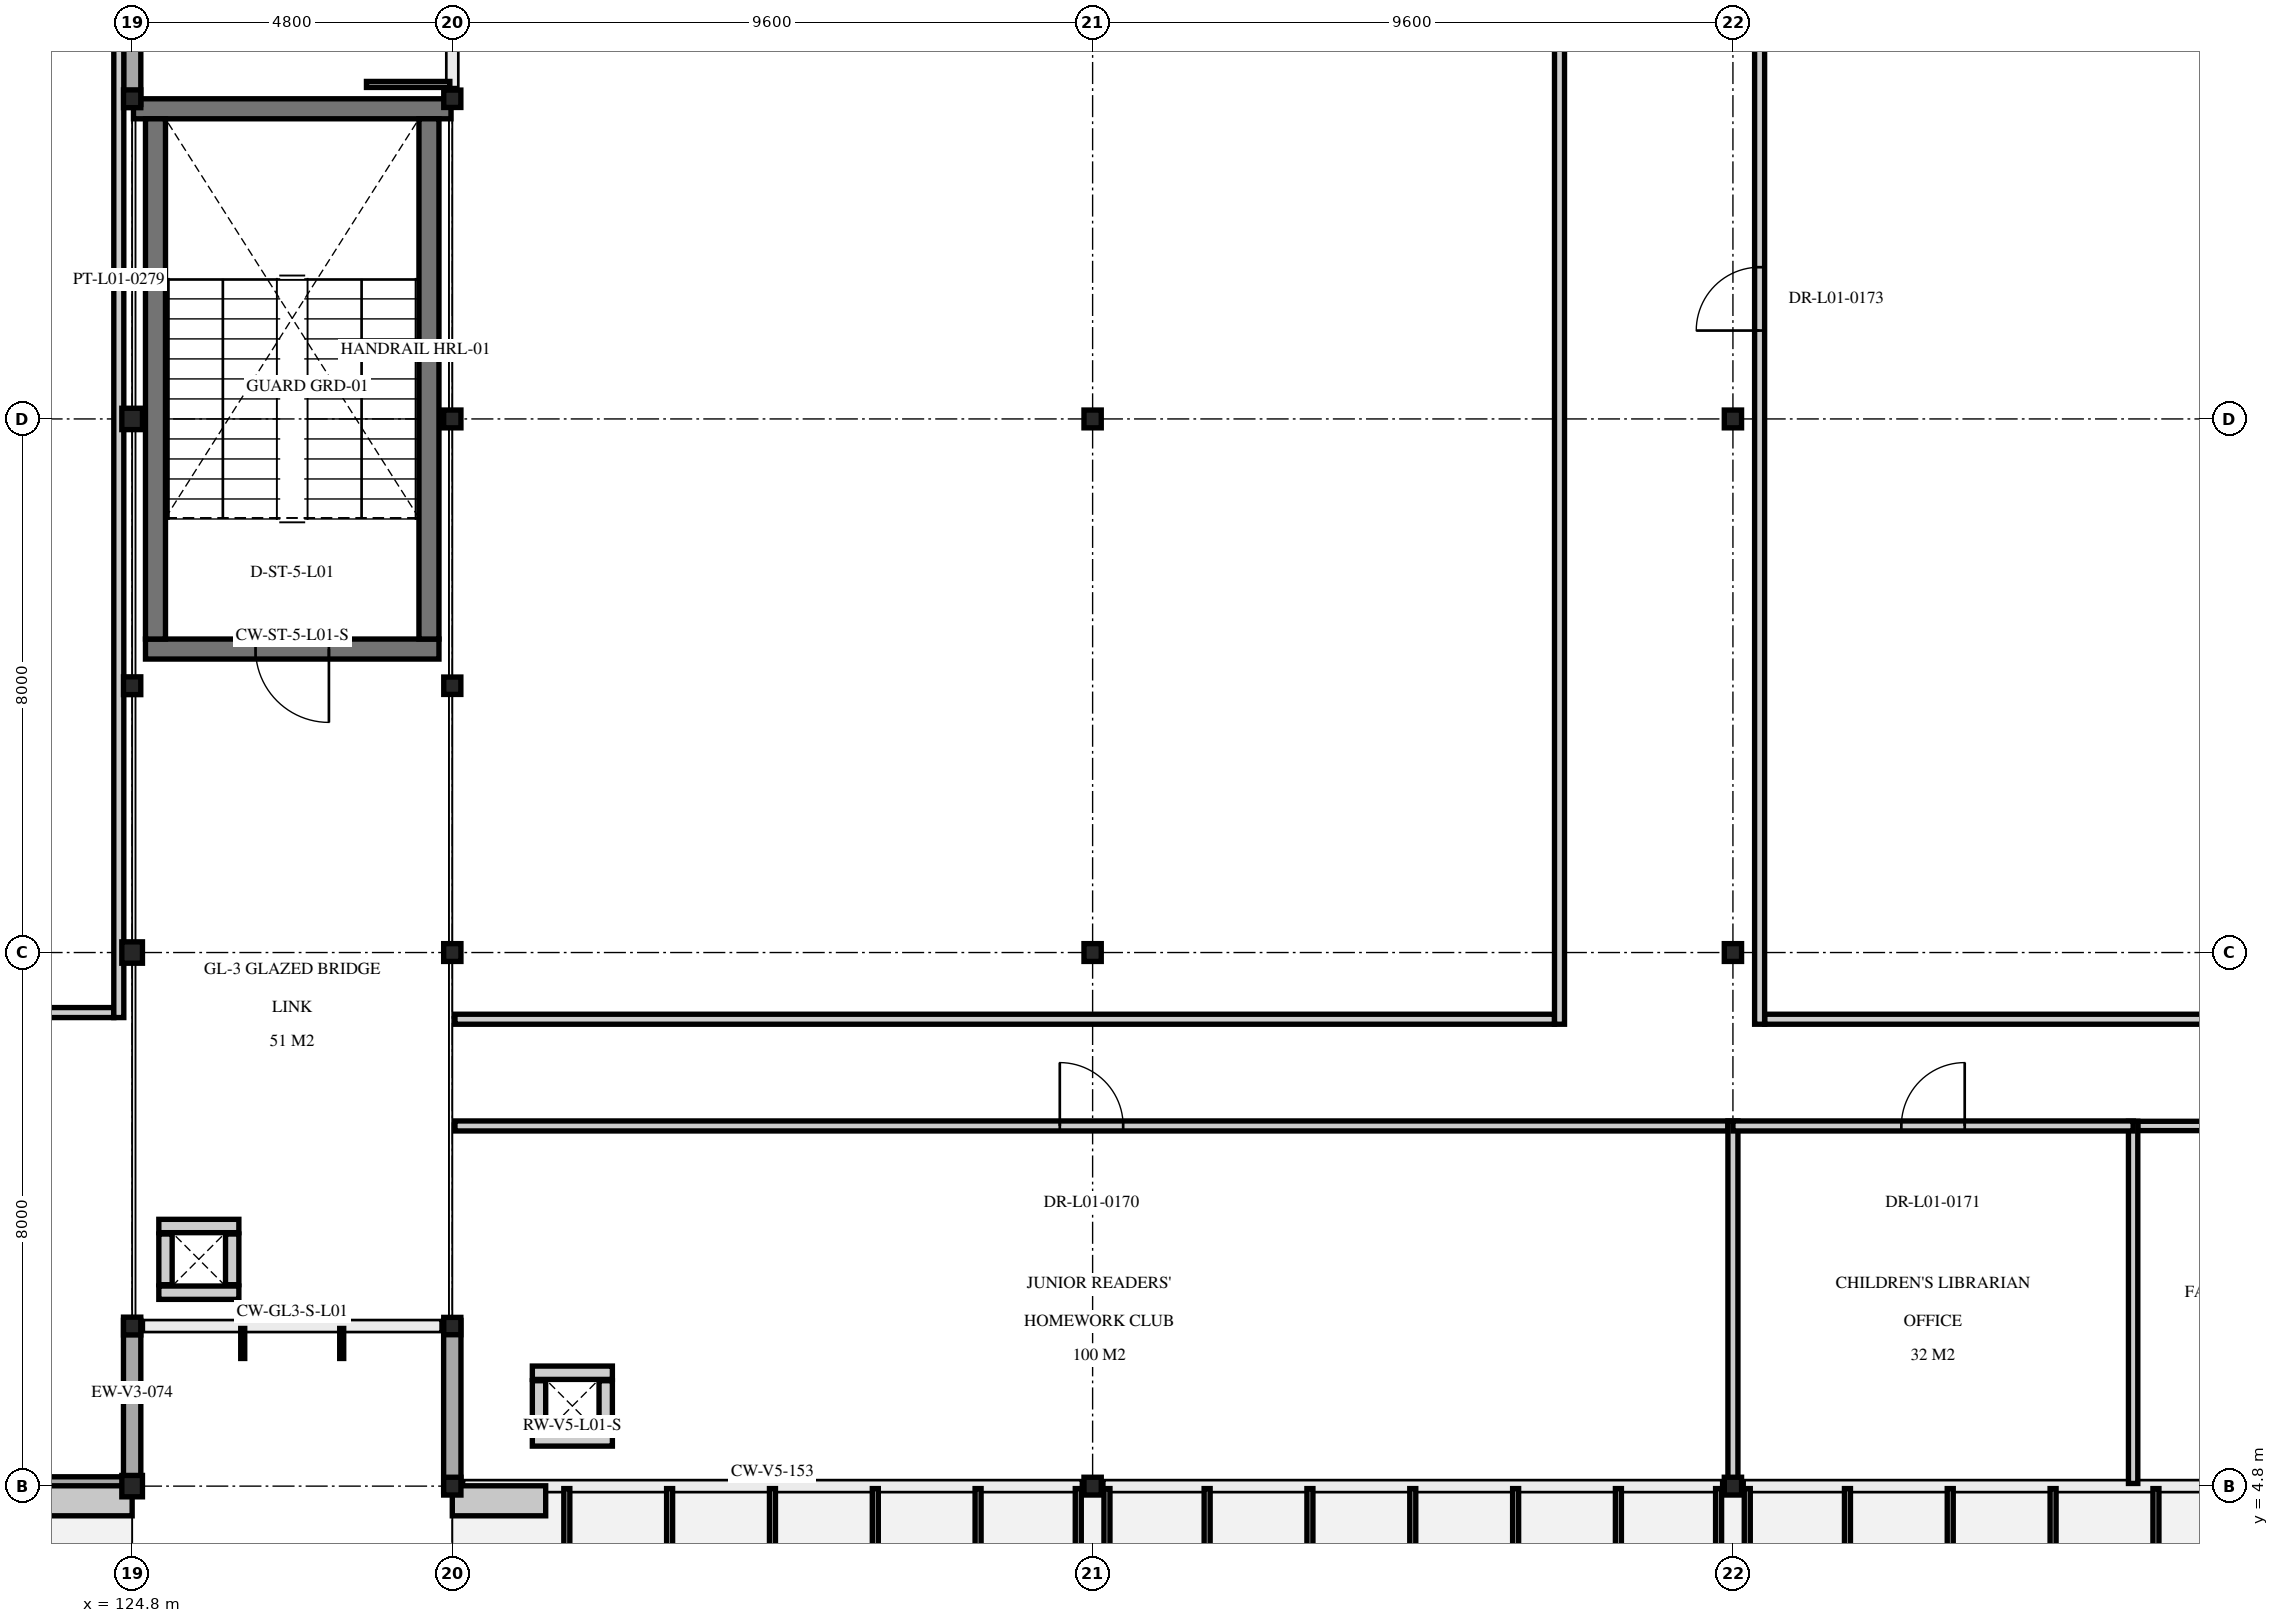
"""IFC4 building model, lengths in metres.
Left out: names, types, materials, properties, quantities, classifications, styles, units other than length and angle.
Written with IfcOpenShell. Run it as: python <this file> out.ifc"""

import sys

from ifc_helpers import new_model, si_unit, direction, frame, frame_2d, origin, origin_2d, place, context, subcontext, project, spatial, rectangle, i_section, extrude, element, fill, save


model = new_model("IFC4")
c1 = context("Model", 3, precision=1e-05, world=origin(), true_north=direction((0.0, 1.0)))
c2 = subcontext(c1, "Body", "Model", "MODEL_VIEW")
j1 = project(units=[si_unit("LENGTHUNIT", "METRE"), si_unit("PLANEANGLEUNIT", "RADIAN")], contexts=[c1])
p1 = place(None, origin())
s1 = spatial("IfcSite", under=j1, at=p1, CompositionType="ELEMENT")
p2 = place(p1, origin())
s2 = spatial("IfcBuilding", under=s1, at=p2, CompositionType="ELEMENT")
p3 = place(p2, frame((0.0, 0.0, 5.1)))
s3 = spatial("IfcBuildingStorey", under=s2, at=p3, CompositionType="ELEMENT", Elevation=5.1)
for number, where, z_axis, x_axis in (
    (1, (124.8, 4.8, 0.0), (0.0, 0.0, 1.0), (1.0, 0.0, 0.0)),
    (2, (124.8, 12.8, 0.0), (0.0, 0.0, 1.0), (1.0, 0.0, 0.0)),
    (3, (124.8, 20.8, 0.0), (0.0, 0.0, 1.0), (1.0, 0.0, 0.0)),
):
    element("IfcColumn", number, at=place(p3, frame(where, z_axis=z_axis, x_axis=x_axis)), inside=s3, PredefinedType="COLUMN", context=c2, shape_type="SweptSolid", body=[
        extrude(i_section(OverallWidth=0.309, OverallDepth=0.321, WebThickness=0.014, FlangeThickness=0.022, at=origin_2d()), origin(), (0.0, 0.0, 1.0), 4.5),
    ])
for number, where, z_axis, x_axis in (
    (4, (124.8, 7.2, 0.0), (0.0, 0.0, 1.0), (1.0, 0.0, 0.0)),
    (5, (124.8, 16.8, 0.0), (0.0, 0.0, 1.0), (1.0, 0.0, 0.0)),
    (6, (124.8, 25.6, 0.0), (0.0, 0.0, 1.0), (1.0, 0.0, 0.0)),
    (7, (129.6, 4.8, 0.0), (0.0, 0.0, 1.0), (1.0, 0.0, 0.0)),
    (8, (129.6, 12.8, 0.0), (0.0, 0.0, 1.0), (1.0, 0.0, 0.0)),
    (9, (129.6, 20.8, 0.0), (0.0, 0.0, 1.0), (1.0, 0.0, 0.0)),
    (10, (139.2, 4.8, 0.0), (0.0, 0.0, 1.0), (1.0, 0.0, 0.0)),
    (11, (139.2, 12.8, 0.0), (0.0, 0.0, 1.0), (1.0, 0.0, 0.0)),
    (12, (139.2, 20.8, 0.0), (0.0, 0.0, 1.0), (1.0, 0.0, 0.0)),
    (13, (148.8, 4.8, 0.0), (0.0, 0.0, 1.0), (1.0, 0.0, 0.0)),
    (14, (148.8, 12.8, 0.0), (0.0, 0.0, 1.0), (1.0, 0.0, 0.0)),
    (15, (148.8, 20.8, 0.0), (0.0, 0.0, 1.0), (1.0, 0.0, 0.0)),
):
    element("IfcColumn", number, at=place(p3, frame(where, z_axis=z_axis, x_axis=x_axis)), inside=s3, PredefinedType="COLUMN", context=c2, shape_type="SweptSolid", body=[
        extrude(i_section(OverallWidth=0.259, OverallDepth=0.267, WebThickness=0.013, FlangeThickness=0.021, at=origin_2d()), origin(), (0.0, 0.0, 1.0), 4.5),
    ])
for number, where, z_axis, x_axis in (
    (16, (129.6, 7.2, 0.0), (0.0, 0.0, 1.0), (1.0, 0.0, 0.0)),
    (17, (129.6, 16.8, 0.0), (0.0, 0.0, 1.0), (1.0, 0.0, 0.0)),
    (18, (129.6, 25.6, 0.0), (0.0, 0.0, 1.0), (1.0, 0.0, 0.0)),
):
    element("IfcColumn", number, at=place(p3, frame(where, z_axis=z_axis, x_axis=x_axis)), inside=s3, PredefinedType="COLUMN", context=c2, shape_type="SweptSolid", body=[
        extrude(i_section(OverallWidth=0.256, OverallDepth=0.26, WebThickness=0.01, FlangeThickness=0.017, at=origin_2d()), origin(), (0.0, 0.0, 1.0), 4.5),
    ])
p4 = place(p3, frame((129.4, 17.35, 0.0), z_axis=(0.0, 0.0, 1.0), x_axis=(-1.0, 0.0, 0.0)))
e19 = element("IfcWall", 19, at=p4, inside=s3, PredefinedType="SHEAR", context=c2, shape_type="SweptSolid", body=[
    extrude(rectangle(XDim=4.4, YDim=0.3, at=frame_2d((2.2, 0.0))), origin(), (0.0, 0.0, 1.0), 4.29),
])
p5 = place(p4, frame((1.65, 0.0, 0.0)))
e20 = element("IfcOpeningElement", 20, at=p5, cuts=e19, PredefinedType="OPENING", context=c2, shape_type="SweptSolid", body=[
    extrude(rectangle(XDim=1.1, YDim=2.2, at=frame_2d((0.55, 1.1))), frame((0.0, 0.16, 0.0), z_axis=(0.0, -1.0, 0.0), x_axis=(1.0, 0.0, 0.0)), (0.0, 0.0, 1.0), 0.32),
])
p6 = place(p3, frame((124.82, 25.45, 0.0), z_axis=(0.0, 0.0, 1.0), x_axis=(1.0, 0.0, 0.0)))
e21 = element("IfcWall", 21, at=p6, inside=s3, PredefinedType="SHEAR", context=c2, shape_type="SweptSolid", body=[
    extrude(rectangle(XDim=4.76, YDim=0.3, at=frame_2d((2.38, 0.0))), origin(), (0.0, 0.0, 1.0), 4.29),
])
for number, where, z_axis, x_axis in (
    (22, (125.15, 17.5, 0.0), (0.0, 0.0, 1.0), (0.0, 1.0, 0.0)),
    (23, (129.25, 25.3, 0.0), (0.0, 0.0, 1.0), (0.0, -1.0, 0.0)),
):
    element("IfcWall", number, at=place(p3, frame(where, z_axis=z_axis, x_axis=x_axis)), inside=s3, PredefinedType="SHEAR", context=c2, shape_type="SweptSolid", body=[
        extrude(rectangle(XDim=7.8, YDim=0.3, at=frame_2d((3.9, 0.0))), origin(), (0.0, 0.0, 1.0), 4.29),
    ])
for number, where, z_axis, x_axis in (
    (24, (132.0, 5.5, 0.0), (0.0, 0.0, 1.0), (-1.0, 0.0, 0.0)),
    (25, (130.8, 6.5, 0.0), (0.0, 0.0, 1.0), (1.0, 0.0, 0.0)),
):
    element("IfcWall", number, at=place(p3, frame(where, z_axis=z_axis, x_axis=x_axis)), inside=s3, PredefinedType="PARTITIONING", context=c2, shape_type="SweptSolid", body=[
        extrude(rectangle(XDim=1.2, YDim=0.2, at=frame_2d((0.6, 0.0))), origin(), (0.0, 0.0, 1.0), 3.79),
    ])
for number, where, z_axis, x_axis in (
    (26, (130.9, 5.62, 0.0), (0.0, 0.0, 1.0), (0.0, 1.0, 0.0)),
    (27, (131.9, 6.38, 0.0), (0.0, 0.0, 1.0), (0.0, -1.0, 0.0)),
):
    element("IfcWall", number, at=place(p3, frame(where, z_axis=z_axis, x_axis=x_axis)), inside=s3, PredefinedType="PARTITIONING", context=c2, shape_type="SweptSolid", body=[
        extrude(rectangle(XDim=0.76, YDim=0.2, at=frame_2d((0.38, 0.0))), origin(), (0.0, 0.0, 1.0), 3.79),
    ])
for number, where, z_axis, x_axis in (
    (28, (126.4, 7.7, 0.0), (0.0, 0.0, 1.0), (-1.0, 0.0, 0.0)),
    (29, (125.2, 8.7, 0.0), (0.0, 0.0, 1.0), (1.0, 0.0, 0.0)),
):
    element("IfcWall", number, at=place(p3, frame(where, z_axis=z_axis, x_axis=x_axis)), inside=s3, PredefinedType="PARTITIONING", context=c2, shape_type="SweptSolid", body=[
        extrude(rectangle(XDim=1.2, YDim=0.2, at=frame_2d((0.6, 0.0))), origin(), (0.0, 0.0, 1.0), 3.79),
    ])
for number, where, z_axis, x_axis in (
    (30, (125.3, 7.82, 0.0), (0.0, 0.0, 1.0), (0.0, 1.0, 0.0)),
    (31, (126.3, 8.58, 0.0), (0.0, 0.0, 1.0), (0.0, -1.0, 0.0)),
):
    element("IfcWall", number, at=place(p3, frame(where, z_axis=z_axis, x_axis=x_axis)), inside=s3, PredefinedType="PARTITIONING", context=c2, shape_type="SweptSolid", body=[
        extrude(rectangle(XDim=0.76, YDim=0.2, at=frame_2d((0.38, 0.0))), origin(), (0.0, 0.0, 1.0), 3.79),
    ])
p7 = place(p3, frame((124.885, 4.8, 0.0), z_axis=(0.0, 0.0, 1.0), x_axis=(-1.0, 0.0, 0.0)))
e32 = element("IfcWall", 32, at=p7, inside=s3, PredefinedType="SOLIDWALL", context=c2, shape_type="SweptSolid", body=[
    extrude(rectangle(XDim=8.17, YDim=0.28, at=frame_2d((4.085, 0.0))), origin(), (0.0, 0.0, 1.0), 3.715),
])
p8 = place(p7, frame((3.185, 0.0, 1.0)))
e33 = element("IfcOpeningElement", 33, at=p8, cuts=e32, PredefinedType="OPENING", context=c2, shape_type="SweptSolid", body=[
    extrude(rectangle(XDim=1.8, YDim=2.1, at=frame_2d((0.9, 1.05))), frame((0.0, 0.15, 0.0), z_axis=(0.0, -1.0, 0.0), x_axis=(1.0, 0.0, 0.0)), (0.0, 0.0, 1.0), 0.3),
])
p9 = place(p3, frame((124.8, 7.285, 0.0), z_axis=(0.0, 0.0, 1.0), x_axis=(0.0, -1.0, 0.0)))
e34 = element("IfcWall", 34, at=p9, inside=s3, PredefinedType="SOLIDWALL", context=c2, shape_type="SweptSolid", body=[
    extrude(rectangle(XDim=2.57, YDim=0.26, at=frame_2d((1.285, 0.0))), origin(), (0.0, 0.0, 1.0), 3.715),
])
p10 = place(p3, frame((124.8, 33.685, 0.0), z_axis=(0.0, 0.0, 1.0), x_axis=(0.0, -1.0, 0.0)))
e35 = element("IfcWall", 35, at=p10, inside=s3, PredefinedType="SOLIDWALL", context=c2, shape_type="SweptSolid", body=[
    extrude(rectangle(XDim=8.17, YDim=0.26, at=frame_2d((4.085, 0.0))), origin(), (0.0, 0.0, 1.0), 3.715),
])
p11 = place(p3, frame((129.6, 4.715, 0.0), z_axis=(0.0, 0.0, 1.0), x_axis=(0.0, 1.0, 0.0)))
e36 = element("IfcWall", 36, at=p11, inside=s3, PredefinedType="SOLIDWALL", context=c2, shape_type="SweptSolid", body=[
    extrude(rectangle(XDim=2.57, YDim=0.26, at=frame_2d((1.285, 0.0))), origin(), (0.0, 0.0, 1.0), 3.875),
])
p12 = place(p3, frame((100.875, 11.9, 0.0), z_axis=(0.0, 0.0, 1.0), x_axis=(1.0, 0.0, 0.0)))
e37 = element("IfcWall", 37, at=p12, inside=s3, PredefinedType="PARTITIONING", context=c2, shape_type="SweptSolid", body=[
    extrude(rectangle(XDim=23.65, YDim=0.15, at=frame_2d((11.825, 0.0))), origin(), (0.0, 0.0, 1.0), 4.015),
])
p13 = place(p3, frame((124.6, 11.825, 0.0), z_axis=(0.0, 0.0, 1.0), x_axis=(0.0, 1.0, 0.0)))
e38 = element("IfcWall", 38, at=p13, inside=s3, PredefinedType="PARTITIONING", context=c2, shape_type="SweptSolid", body=[
    extrude(rectangle(XDim=21.735, YDim=0.15, at=frame_2d((10.868, 0.0))), origin(), (0.0, 0.0, 1.0), 3.715),
])
p14 = place(p3, frame((154.87, 10.2, 0.0), z_axis=(0.0, 0.0, 1.0), x_axis=(1.0, 0.0, 0.0)))
e39 = element("IfcWall", 39, at=p14, inside=s3, PredefinedType="PARTITIONING", context=c2, shape_type="SweptSolid", body=[
    extrude(rectangle(XDim=4.66, YDim=0.14, at=frame_2d((2.33, 0.0))), origin(), (0.0, 0.0, 1.0), 3.91),
])
p15 = place(p14, frame((1.855, 0.0, 0.0)))
e40 = element("IfcOpeningElement", 40, at=p15, cuts=e39, PredefinedType="OPENING", context=c2, shape_type="SweptSolid", body=[
    extrude(rectangle(XDim=0.95, YDim=2.1, at=frame_2d((0.475, 1.05))), frame((0.0, 0.08, 0.0), z_axis=(0.0, -1.0, 0.0), x_axis=(1.0, 0.0, 0.0)), (0.0, 0.0, 1.0), 0.16),
])
p16 = place(p3, frame((154.8, 4.84, 0.0), z_axis=(0.0, 0.0, 1.0), x_axis=(0.0, 1.0, 0.0)))
e41 = element("IfcWall", 41, at=p16, inside=s3, PredefinedType="PARTITIONING", context=c2, shape_type="SweptSolid", body=[
    extrude(rectangle(XDim=5.43, YDim=0.14, at=frame_2d((2.715, 0.0))), origin(), (0.0, 0.0, 1.0), 3.945),
])
p17 = place(p3, frame((129.64, 10.2, 0.0), z_axis=(0.0, 0.0, 1.0), x_axis=(1.0, 0.0, 0.0)))
e42 = element("IfcWall", 42, at=p17, inside=s3, PredefinedType="PARTITIONING", context=c2, shape_type="SweptSolid", body=[
    extrude(rectangle(XDim=19.085, YDim=0.15, at=frame_2d((9.542, 0.0))), origin(), (0.0, 0.0, 1.0), 3.91),
])
p18 = place(p17, frame((9.068, 0.0, 0.0)))
e43 = element("IfcOpeningElement", 43, at=p18, cuts=e42, PredefinedType="OPENING", context=c2, shape_type="SweptSolid", body=[
    extrude(rectangle(XDim=0.95, YDim=2.15, at=frame_2d((0.475, 1.075))), frame((0.0, 0.085, 0.0), z_axis=(0.0, -1.0, 0.0), x_axis=(1.0, 0.0, 0.0)), (0.0, 0.0, 1.0), 0.17),
])
p19 = place(p3, frame((148.8, 4.84, 0.0), z_axis=(0.0, 0.0, 1.0), x_axis=(0.0, 1.0, 0.0)))
e44 = element("IfcWall", 44, at=p19, inside=s3, PredefinedType="PARTITIONING", context=c2, shape_type="SweptSolid", body=[
    extrude(rectangle(XDim=5.435, YDim=0.15, at=frame_2d((2.717, 0.0))), origin(), (0.0, 0.0, 1.0), 3.91),
])
p20 = place(p3, frame((148.8, 10.2, 0.0), z_axis=(0.0, 0.0, 1.0), x_axis=(1.0, 0.0, 0.0)))
e45 = element("IfcWall", 45, at=p20, inside=s3, PredefinedType="PARTITIONING", context=c2, shape_type="SweptSolid", body=[
    extrude(rectangle(XDim=6.0, YDim=0.15, at=frame_2d((3.0, 0.0))), origin(), (0.0, 0.0, 1.0), 3.91),
])
p21 = place(p20, frame((2.525, 0.0, 0.0)))
e46 = element("IfcOpeningElement", 46, at=p21, cuts=e45, PredefinedType="OPENING", context=c2, shape_type="SweptSolid", body=[
    extrude(rectangle(XDim=0.95, YDim=2.15, at=frame_2d((0.475, 1.075))), frame((0.0, 0.085, 0.0), z_axis=(0.0, -1.0, 0.0), x_axis=(1.0, 0.0, 0.0)), (0.0, 0.0, 1.0), 0.17),
])
p22 = place(p3, frame((129.64, 11.8, 0.0), z_axis=(0.0, 0.0, 1.0), x_axis=(1.0, 0.0, 0.0)))
e47 = element("IfcWall", 47, at=p22, inside=s3, PredefinedType="PARTITIONING", context=c2, shape_type="SweptSolid", body=[
    extrude(rectangle(XDim=16.485, YDim=0.15, at=frame_2d((8.243, 0.0))), origin(), (0.0, 0.0, 1.0), 3.91),
])
p23 = place(p3, frame((146.2, 11.725, 0.0), z_axis=(0.0, 0.0, 1.0), x_axis=(0.0, 1.0, 0.0)))
e48 = element("IfcWall", 48, at=p23, inside=s3, PredefinedType="PARTITIONING", context=c2, shape_type="SweptSolid", body=[
    extrude(rectangle(XDim=33.035, YDim=0.15, at=frame_2d((16.518, 0.0))), origin(), (0.0, 0.0, 1.0), 3.945),
])
p24 = place(p23, frame((15.717, 0.0, 0.0)))
e49 = element("IfcOpeningElement", 49, at=p24, cuts=e48, PredefinedType="OPENING", context=c2, shape_type="SweptSolid", body=[
    extrude(rectangle(XDim=1.6, YDim=2.25, at=frame_2d((0.8, 1.125))), frame((0.0, 0.085, 0.0), z_axis=(0.0, -1.0, 0.0), x_axis=(1.0, 0.0, 0.0)), (0.0, 0.0, 1.0), 0.17),
])
p25 = place(p3, frame((149.275, 11.8, 0.0), z_axis=(0.0, 0.0, 1.0), x_axis=(1.0, 0.0, 0.0)))
e50 = element("IfcWall", 50, at=p25, inside=s3, PredefinedType="PARTITIONING", context=c2, shape_type="SweptSolid", body=[
    extrude(rectangle(XDim=18.335, YDim=0.15, at=frame_2d((9.167, 0.0))), origin(), (0.0, 0.0, 1.0), 3.91),
])
p26 = place(p3, frame((149.2, 11.725, 0.0), z_axis=(0.0, 0.0, 1.0), x_axis=(0.0, 1.0, 0.0)))
e51 = element("IfcWall", 51, at=p26, inside=s3, PredefinedType="PARTITIONING", context=c2, shape_type="SweptSolid", body=[
    extrude(rectangle(XDim=18.75, YDim=0.15, at=frame_2d((9.375, 0.0))), origin(), (0.0, 0.0, 1.0), 3.945),
])
p27 = place(p26, frame((10.4, 0.0, 0.0)))
e52 = element("IfcOpeningElement", 52, at=p27, cuts=e51, PredefinedType="OPENING", context=c2, shape_type="SweptSolid", body=[
    extrude(rectangle(XDim=0.95, YDim=2.15, at=frame_2d((0.475, 1.075))), frame((0.0, 0.085, 0.0), z_axis=(0.0, -1.0, 0.0), x_axis=(1.0, 0.0, 0.0)), (0.0, 0.0, 1.0), 0.17),
])
p28 = place(p5, origin())
e53 = element("IfcDoor", 53, at=p28, inside=s3, OperationType="SINGLE_SWING_LEFT", PredefinedType="DOOR", context=c2, shape_type="SweptSolid", body=[
    extrude(rectangle(XDim=1.1, YDim=2.2, at=frame_2d((0.55, 1.1))), frame((0.0, 0.025, 0.0), z_axis=(0.0, -1.0, 0.0), x_axis=(1.0, 0.0, 0.0)), (0.0, 0.0, 1.0), 0.05),
])
fill(e20, e53)
p29 = place(p18, origin())
e54 = element("IfcDoor", 54, at=p29, inside=s3, OperationType="SINGLE_SWING_LEFT", PredefinedType="DOOR", context=c2, shape_type="SweptSolid", body=[
    extrude(rectangle(XDim=0.95, YDim=2.15, at=frame_2d((0.475, 1.075))), frame((0.0, 0.025, 0.0), z_axis=(0.0, -1.0, 0.0), x_axis=(1.0, 0.0, 0.0)), (0.0, 0.0, 1.0), 0.05),
])
fill(e43, e54)
p30 = place(p21, origin())
e55 = element("IfcDoor", 55, at=p30, inside=s3, OperationType="SINGLE_SWING_RIGHT", PredefinedType="DOOR", context=c2, shape_type="SweptSolid", body=[
    extrude(rectangle(XDim=0.95, YDim=2.15, at=frame_2d((0.475, 1.075))), frame((0.0, 0.025, 0.0), z_axis=(0.0, -1.0, 0.0), x_axis=(1.0, 0.0, 0.0)), (0.0, 0.0, 1.0), 0.05),
])
fill(e46, e55)
p31 = place(p27, origin())
e56 = element("IfcDoor", 56, at=p31, inside=s3, OperationType="SINGLE_SWING_LEFT", PredefinedType="DOOR", context=c2, shape_type="SweptSolid", body=[
    extrude(rectangle(XDim=0.95, YDim=2.15, at=frame_2d((0.475, 1.075))), frame((0.0, 0.025, 0.0), z_axis=(0.0, -1.0, 0.0), x_axis=(1.0, 0.0, 0.0)), (0.0, 0.0, 1.0), 0.05),
])
fill(e52, e56)
save(model, sys.argv[1])
